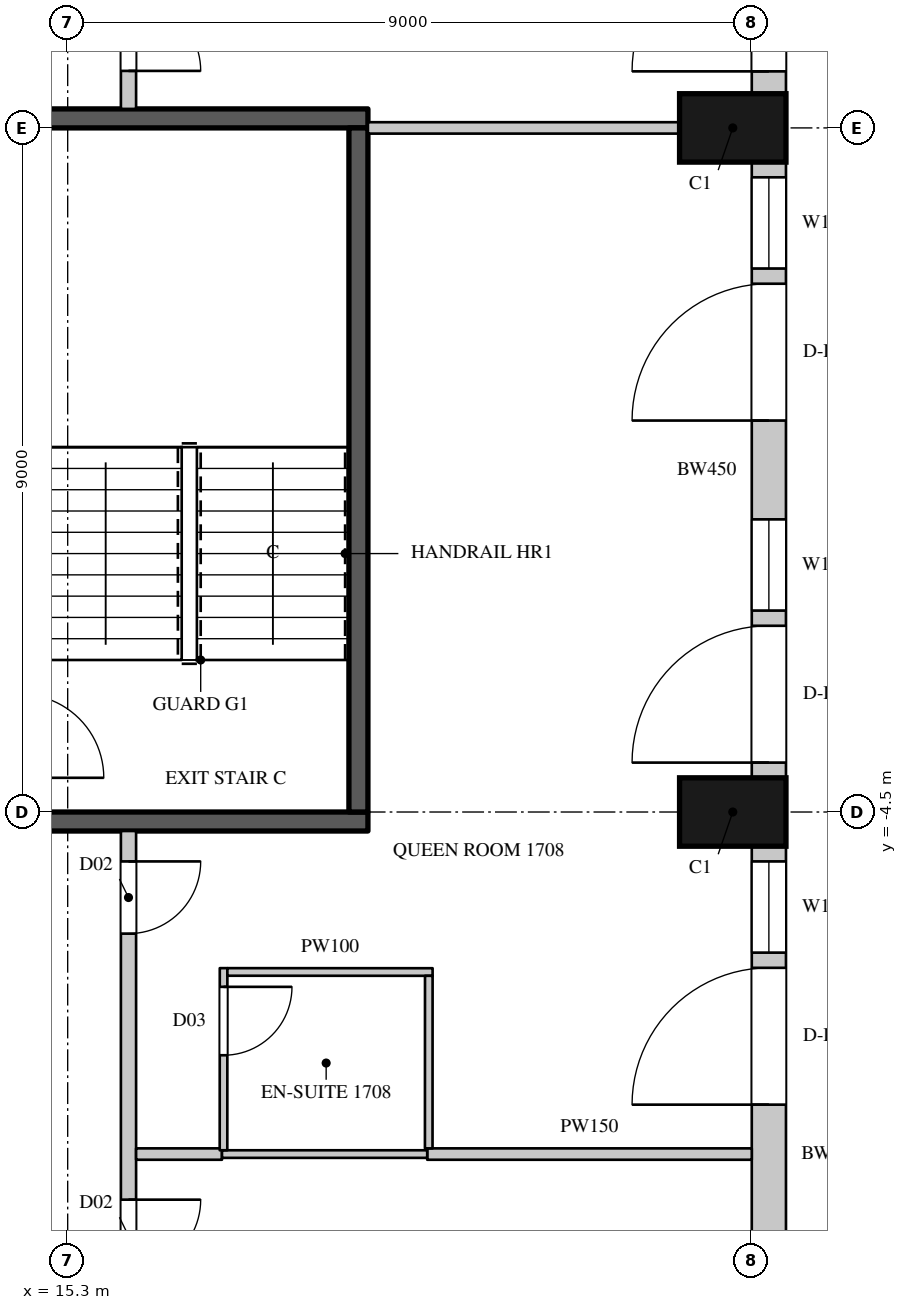
"""IFC4 building model, lengths in metres.
Left out: names, types, materials, properties, quantities, classifications, styles, units other than length and angle.
Written with IfcOpenShell. Run it as: python <this file> out.ifc"""

import sys

from ifc_helpers import new_model, si_unit, direction, frame, frame_2d, origin, origin_2d, place, context, subcontext, project, spatial, rectangle, extrude, element, fill, save


model = new_model("IFC4")
c1 = context("Model", 3, precision=1e-05, world=origin(), true_north=direction((0.0, 1.0)))
c2 = subcontext(c1, "Body", "Model", "MODEL_VIEW")
j1 = project(units=[si_unit("LENGTHUNIT", "METRE"), si_unit("PLANEANGLEUNIT", "RADIAN")], contexts=[c1])
p1 = place(None, origin())
s1 = spatial("IfcSite", under=j1, at=p1, CompositionType="ELEMENT")
p2 = place(p1, origin())
s2 = spatial("IfcBuilding", under=s1, at=p2, CompositionType="ELEMENT")
p3 = place(p2, frame((0.0, 0.0, 91.5)))
s3 = spatial("IfcBuildingStorey", under=s2, at=p3, CompositionType="ELEMENT", Elevation=91.5)
for number, where, z_axis, x_axis in (
    (1, (24.05, -4.5, 0.0), (0.0, 0.0, 1.0), (0.0, 1.0, 0.0)),
    (2, (24.05, 4.5, 0.0), (0.0, 0.0, 1.0), (0.0, 1.0, 0.0)),
):
    element("IfcColumn", number, at=place(p3, frame(where, z_axis=z_axis, x_axis=x_axis)), inside=s3, PredefinedType="COLUMN", context=c2, shape_type="SweptSolid", body=[
        extrude(rectangle(XDim=0.9, YDim=1.4, at=origin_2d()), origin(), (0.0, 0.0, 1.0), 3.6),
    ])
p4 = place(p3, frame((24.525, -13.05, 0.0), z_axis=(0.0, 0.0, 1.0), x_axis=(0.0, 1.0, 0.0)))
e3 = element("IfcWall", 3, at=p4, inside=s3, PredefinedType="SOLIDWALL", context=c2, shape_type="SweptSolid", body=[
    extrude(rectangle(XDim=8.1, YDim=0.45, at=frame_2d((4.05, 0.0))), origin(), (0.0, 0.0, 1.0), 3.3),
])
p5 = place(p4, frame((0.9, 0.0, 0.0)))
e4 = element("IfcOpeningElement", 4, at=p5, cuts=e3, PredefinedType="OPENING", context=c2, shape_type="SweptSolid", body=[
    extrude(rectangle(XDim=1.8, YDim=2.4, at=frame_2d((0.9, 1.2))), frame((0.0, 0.235, 0.0), z_axis=(0.0, -1.0, 0.0), x_axis=(1.0, 0.0, 0.0)), (0.0, 0.0, 1.0), 0.47),
])
p6 = place(p4, frame((4.7, 0.0, 0.0)))
e5 = element("IfcOpeningElement", 5, at=p6, cuts=e3, PredefinedType="OPENING", context=c2, shape_type="SweptSolid", body=[
    extrude(rectangle(XDim=1.8, YDim=2.4, at=frame_2d((0.9, 1.2))), frame((0.0, 0.235, 0.0), z_axis=(0.0, -1.0, 0.0), x_axis=(1.0, 0.0, 0.0)), (0.0, 0.0, 1.0), 0.47),
])
p7 = place(p4, frame((6.7, 0.0, 1.05)))
e6 = element("IfcOpeningElement", 6, at=p7, cuts=e3, PredefinedType="OPENING", context=c2, shape_type="SweptSolid", body=[
    extrude(rectangle(XDim=1.2, YDim=2.0, at=frame_2d((0.6, 1.0))), frame((0.0, 0.235, 0.0), z_axis=(0.0, -1.0, 0.0), x_axis=(1.0, 0.0, 0.0)), (0.0, 0.0, 1.0), 0.47),
])
p8 = place(p3, frame((24.525, -4.05, 0.0), z_axis=(0.0, 0.0, 1.0), x_axis=(0.0, 1.0, 0.0)))
e7 = element("IfcWall", 7, at=p8, inside=s3, PredefinedType="SOLIDWALL", context=c2, shape_type="SweptSolid", body=[
    extrude(rectangle(XDim=8.1, YDim=0.45, at=frame_2d((4.05, 0.0))), origin(), (0.0, 0.0, 1.0), 3.3),
])
p9 = place(p8, frame((0.2, 0.0, 0.0)))
e8 = element("IfcOpeningElement", 8, at=p9, cuts=e7, PredefinedType="OPENING", context=c2, shape_type="SweptSolid", body=[
    extrude(rectangle(XDim=1.8, YDim=2.4, at=frame_2d((0.9, 1.2))), frame((0.0, 0.235, 0.0), z_axis=(0.0, -1.0, 0.0), x_axis=(1.0, 0.0, 0.0)), (0.0, 0.0, 1.0), 0.47),
])
p10 = place(p8, frame((2.2, 0.0, 1.05)))
e9 = element("IfcOpeningElement", 9, at=p10, cuts=e7, PredefinedType="OPENING", context=c2, shape_type="SweptSolid", body=[
    extrude(rectangle(XDim=1.2, YDim=2.0, at=frame_2d((0.6, 1.0))), frame((0.0, 0.235, 0.0), z_axis=(0.0, -1.0, 0.0), x_axis=(1.0, 0.0, 0.0)), (0.0, 0.0, 1.0), 0.47),
])
p11 = place(p8, frame((4.7, 0.0, 0.0)))
e10 = element("IfcOpeningElement", 10, at=p11, cuts=e7, PredefinedType="OPENING", context=c2, shape_type="SweptSolid", body=[
    extrude(rectangle(XDim=1.8, YDim=2.4, at=frame_2d((0.9, 1.2))), frame((0.0, 0.235, 0.0), z_axis=(0.0, -1.0, 0.0), x_axis=(1.0, 0.0, 0.0)), (0.0, 0.0, 1.0), 0.47),
])
p12 = place(p8, frame((6.7, 0.0, 1.05)))
e11 = element("IfcOpeningElement", 11, at=p12, cuts=e7, PredefinedType="OPENING", context=c2, shape_type="SweptSolid", body=[
    extrude(rectangle(XDim=1.2, YDim=2.0, at=frame_2d((0.6, 1.0))), frame((0.0, 0.235, 0.0), z_axis=(0.0, -1.0, 0.0), x_axis=(1.0, 0.0, 0.0)), (0.0, 0.0, 1.0), 0.47),
])
p13 = place(p3, frame((24.525, 4.95, 0.0), z_axis=(0.0, 0.0, 1.0), x_axis=(0.0, 1.0, 0.0)))
e12 = element("IfcWall", 12, at=p13, inside=s3, PredefinedType="SOLIDWALL", context=c2, shape_type="SweptSolid", body=[
    extrude(rectangle(XDim=8.439, YDim=0.45, at=frame_2d((4.219, 0.0))), origin(), (0.0, 0.0, 1.0), 3.3),
])
p14 = place(p13, frame((0.294, 0.0, 0.0)))
e13 = element("IfcOpeningElement", 13, at=p14, cuts=e12, PredefinedType="OPENING", context=c2, shape_type="SweptSolid", body=[
    extrude(rectangle(XDim=1.8, YDim=2.4, at=frame_2d((0.9, 1.2))), frame((0.0, 0.235, 0.0), z_axis=(0.0, -1.0, 0.0), x_axis=(1.0, 0.0, 0.0)), (0.0, 0.0, 1.0), 0.47),
])
p15 = place(p13, frame((2.294, 0.0, 1.05)))
e14 = element("IfcOpeningElement", 14, at=p15, cuts=e12, PredefinedType="OPENING", context=c2, shape_type="SweptSolid", body=[
    extrude(rectangle(XDim=1.2, YDim=2.0, at=frame_2d((0.6, 1.0))), frame((0.0, 0.235, 0.0), z_axis=(0.0, -1.0, 0.0), x_axis=(1.0, 0.0, 0.0)), (0.0, 0.0, 1.0), 0.47),
])
p16 = place(p13, frame((5.232, 0.0, 1.05)))
e15 = element("IfcOpeningElement", 15, at=p16, cuts=e12, PredefinedType="OPENING", context=c2, shape_type="SweptSolid", body=[
    extrude(rectangle(XDim=2.7, YDim=2.0, at=frame_2d((1.35, 1.0))), frame((0.0, 0.235, 0.0), z_axis=(0.0, -1.0, 0.0), x_axis=(1.0, 0.0, 0.0)), (0.0, 0.0, 1.0), 0.47),
])
p17 = place(p3, frame((16.1, -17.5, 0.0), z_axis=(0.0, 0.0, 1.0), x_axis=(0.0, 1.0, 0.0)))
e16 = element("IfcWall", 16, at=p17, inside=s3, PredefinedType="PARTITIONING", context=c2, shape_type="SweptSolid", body=[
    extrude(rectangle(XDim=12.75, YDim=0.2, at=frame_2d((6.375, 0.0))), origin(), (0.0, 0.0, 1.0), 3.3),
])
p18 = place(p17, frame((2.75, 0.0, 0.0)))
e17 = element("IfcOpeningElement", 17, at=p18, cuts=e16, PredefinedType="OPENING", context=c2, shape_type="SweptSolid", body=[
    extrude(rectangle(XDim=0.95, YDim=2.2, at=frame_2d((0.475, 1.1))), frame((0.0, 0.11, 0.0), z_axis=(0.0, -1.0, 0.0), x_axis=(1.0, 0.0, 0.0)), (0.0, 0.0, 1.0), 0.22),
])
p19 = place(p17, frame((6.95, 0.0, 0.0)))
e18 = element("IfcOpeningElement", 18, at=p19, cuts=e16, PredefinedType="OPENING", context=c2, shape_type="SweptSolid", body=[
    extrude(rectangle(XDim=0.95, YDim=2.2, at=frame_2d((0.475, 1.1))), frame((0.0, 0.11, 0.0), z_axis=(0.0, -1.0, 0.0), x_axis=(1.0, 0.0, 0.0)), (0.0, 0.0, 1.0), 0.22),
])
p20 = place(p17, frame((11.4, 0.0, 0.0)))
e19 = element("IfcOpeningElement", 19, at=p20, cuts=e16, PredefinedType="OPENING", context=c2, shape_type="SweptSolid", body=[
    extrude(rectangle(XDim=0.95, YDim=2.2, at=frame_2d((0.475, 1.1))), frame((0.0, 0.11, 0.0), z_axis=(0.0, -1.0, 0.0), x_axis=(1.0, 0.0, 0.0)), (0.0, 0.0, 1.0), 0.22),
])
p21 = place(p3, frame((16.1, 4.75, 0.0), z_axis=(0.0, 0.0, 1.0), x_axis=(0.0, 1.0, 0.0)))
e20 = element("IfcWall", 20, at=p21, inside=s3, PredefinedType="PARTITIONING", context=c2, shape_type="SweptSolid", body=[
    extrude(rectangle(XDim=12.65, YDim=0.2, at=frame_2d((6.325, 0.0))), origin(), (0.0, 0.0, 1.0), 3.3),
])
p22 = place(p21, frame((0.5, 0.0, 0.0)))
e21 = element("IfcOpeningElement", 21, at=p22, cuts=e20, PredefinedType="OPENING", context=c2, shape_type="SweptSolid", body=[
    extrude(rectangle(XDim=0.95, YDim=2.2, at=frame_2d((0.475, 1.1))), frame((0.0, 0.11, 0.0), z_axis=(0.0, -1.0, 0.0), x_axis=(1.0, 0.0, 0.0)), (0.0, 0.0, 1.0), 0.22),
])
p23 = place(p21, frame((6.9, 0.0, 0.0)))
e22 = element("IfcOpeningElement", 22, at=p23, cuts=e20, PredefinedType="OPENING", context=c2, shape_type="SweptSolid", body=[
    extrude(rectangle(XDim=0.95, YDim=2.2, at=frame_2d((0.475, 1.1))), frame((0.0, 0.11, 0.0), z_axis=(0.0, -1.0, 0.0), x_axis=(1.0, 0.0, 0.0)), (0.0, 0.0, 1.0), 0.22),
])
p24 = place(p3, frame((16.2, -9.0, 0.0), z_axis=(0.0, 0.0, 1.0), x_axis=(1.0, 0.0, 0.0)))
e23 = element("IfcWall", 23, at=p24, inside=s3, PredefinedType="PARTITIONING", context=c2, shape_type="SweptSolid", body=[
    extrude(rectangle(XDim=1.13, YDim=0.15, at=frame_2d((0.565, 0.0))), origin(), (0.0, 0.0, 1.0), 2.65),
])
p25 = place(p3, frame((19.25, 4.5, 0.0), z_axis=(0.0, 0.0, 1.0), x_axis=(1.0, 0.0, 0.0)))
e24 = element("IfcWall", 24, at=p25, inside=s3, PredefinedType="PARTITIONING", context=c2, shape_type="SweptSolid", body=[
    extrude(rectangle(XDim=4.1, YDim=0.15, at=frame_2d((2.05, 0.0))), origin(), (0.0, 0.0, 1.0), 3.3),
])
p26 = place(p3, frame((20.03, -9.0, 0.0), z_axis=(0.0, 0.0, 1.0), x_axis=(1.0, 0.0, 0.0)))
e25 = element("IfcWall", 25, at=p26, inside=s3, PredefinedType="PARTITIONING", context=c2, shape_type="SweptSolid", body=[
    extrude(rectangle(XDim=4.27, YDim=0.15, at=frame_2d((2.135, 0.0))), origin(), (0.0, 0.0, 1.0), 2.65),
])
for number, where, z_axis, x_axis in (
    (26, (14.55, -4.625, 0.0), (0.0, 0.0, 1.0), (1.0, 0.0, 0.0)),
    (27, (14.55, 4.625, 0.0), (0.0, 0.0, 1.0), (1.0, 0.0, 0.0)),
):
    element("IfcWall", number, at=place(p3, frame(where, z_axis=z_axis, x_axis=x_axis)), inside=s3, PredefinedType="SHEAR", context=c2, shape_type="SweptSolid", body=[
        extrude(rectangle(XDim=4.7, YDim=0.25, at=frame_2d((2.35, 0.0))), origin(), (0.0, 0.0, 1.0), 3.3),
    ])
p27 = place(p3, frame((19.125, -4.5, 0.0), z_axis=(0.0, 0.0, 1.0), x_axis=(0.0, 1.0, 0.0)))
e28 = element("IfcWall", 28, at=p27, inside=s3, PredefinedType="SHEAR", context=c2, shape_type="SweptSolid", body=[
    extrude(rectangle(XDim=9.0, YDim=0.25, at=frame_2d((4.5, 0.0))), origin(), (0.0, 0.0, 1.0), 3.3),
])
p28 = place(p3, frame((17.33, -9.0, 0.0), z_axis=(0.0, 0.0, 1.0), x_axis=(1.0, 0.0, 0.0)))
e29 = element("IfcWall", 29, at=p28, inside=s3, PredefinedType="PARTITIONING", context=c2, shape_type="SweptSolid", body=[
    extrude(rectangle(XDim=2.7, YDim=0.1, at=frame_2d((1.35, 0.0))), origin(), (0.0, 0.0, 1.0), 2.65),
])
p29 = place(p3, frame((17.35, -8.95, 0.0), z_axis=(0.0, 0.0, 1.0), x_axis=(0.000407580973, 0.999999916939, 0.0)))
e30 = element("IfcWall", 30, at=p29, inside=s3, PredefinedType="PARTITIONING", context=c2, shape_type="SweptSolid", body=[
    extrude(rectangle(XDim=2.396, YDim=0.1, at=frame_2d((1.198, 0.0))), origin(), (0.0, 0.0, 1.0), 3.3),
])
p30 = place(p29, frame((1.25, 0.0, 0.0)))
e31 = element("IfcOpeningElement", 31, at=p30, cuts=e30, PredefinedType="OPENING", context=c2, shape_type="SweptSolid", body=[
    extrude(rectangle(XDim=0.9, YDim=2.2, at=frame_2d((0.45, 1.1))), frame((0.0, 0.06, 0.0), z_axis=(0.0, -1.0, 0.0), x_axis=(1.0, 0.0, 0.0)), (0.0, 0.0, 1.0), 0.12),
])
p31 = place(p3, frame((17.401, -6.604, 0.0), z_axis=(0.0, 0.0, 1.0), x_axis=(0.9999999346, -0.000361663629, 0.0)))
e32 = element("IfcWall", 32, at=p31, inside=s3, PredefinedType="PARTITIONING", context=c2, shape_type="SweptSolid", body=[
    extrude(rectangle(XDim=2.7, YDim=0.1, at=frame_2d((1.35, 0.0))), origin(), (0.0, 0.0, 1.0), 3.3),
])
p32 = place(p3, frame((20.05, -8.925, 0.0), z_axis=(0.0, 0.0, 1.0), x_axis=(0.000430200003, 0.999999907464, 0.0)))
e33 = element("IfcWall", 33, at=p32, inside=s3, PredefinedType="PARTITIONING", context=c2, shape_type="SweptSolid", body=[
    extrude(rectangle(XDim=2.27, YDim=0.1, at=frame_2d((1.135, 0.0))), origin(), (0.0, 0.0, 1.0), 3.3),
])
p33 = place(p6, origin())
e34 = element("IfcDoor", 34, at=p33, inside=s3, OperationType="SLIDING_TO_LEFT", PredefinedType="DOOR", context=c2, shape_type="SweptSolid", body=[
    extrude(rectangle(XDim=1.8, YDim=2.4, at=frame_2d((0.9, 1.2))), frame((0.0, 0.13, 0.0), z_axis=(0.0, -1.0, 0.0), x_axis=(1.0, 0.0, 0.0)), (0.0, 0.0, 1.0), 0.05),
])
fill(e5, e34)
p34 = place(p7, origin())
e35 = element("IfcWindow", 35, at=p34, inside=s3, PartitioningType="SINGLE_PANEL", PredefinedType="WINDOW", context=c2, shape_type="SweptSolid", body=[
    extrude(rectangle(XDim=1.2, YDim=2.0, at=frame_2d((0.6, 1.0))), frame((0.0, 0.135, 0.0), z_axis=(0.0, -1.0, 0.0), x_axis=(1.0, 0.0, 0.0)), (0.0, 0.0, 1.0), 0.06),
])
fill(e6, e35)
p35 = place(p9, origin())
e36 = element("IfcDoor", 36, at=p35, inside=s3, OperationType="SLIDING_TO_LEFT", PredefinedType="DOOR", context=c2, shape_type="SweptSolid", body=[
    extrude(rectangle(XDim=1.8, YDim=2.4, at=frame_2d((0.9, 1.2))), frame((0.0, 0.13, 0.0), z_axis=(0.0, -1.0, 0.0), x_axis=(1.0, 0.0, 0.0)), (0.0, 0.0, 1.0), 0.05),
])
fill(e8, e36)
p36 = place(p10, origin())
e37 = element("IfcWindow", 37, at=p36, inside=s3, PartitioningType="SINGLE_PANEL", PredefinedType="WINDOW", context=c2, shape_type="SweptSolid", body=[
    extrude(rectangle(XDim=1.2, YDim=2.0, at=frame_2d((0.6, 1.0))), frame((0.0, 0.135, 0.0), z_axis=(0.0, -1.0, 0.0), x_axis=(1.0, 0.0, 0.0)), (0.0, 0.0, 1.0), 0.06),
])
fill(e9, e37)
p37 = place(p11, origin())
e38 = element("IfcDoor", 38, at=p37, inside=s3, OperationType="SLIDING_TO_LEFT", PredefinedType="DOOR", context=c2, shape_type="SweptSolid", body=[
    extrude(rectangle(XDim=1.8, YDim=2.4, at=frame_2d((0.9, 1.2))), frame((0.0, 0.13, 0.0), z_axis=(0.0, -1.0, 0.0), x_axis=(1.0, 0.0, 0.0)), (0.0, 0.0, 1.0), 0.05),
])
fill(e10, e38)
p38 = place(p12, origin())
e39 = element("IfcWindow", 39, at=p38, inside=s3, PartitioningType="SINGLE_PANEL", PredefinedType="WINDOW", context=c2, shape_type="SweptSolid", body=[
    extrude(rectangle(XDim=1.2, YDim=2.0, at=frame_2d((0.6, 1.0))), frame((0.0, 0.135, 0.0), z_axis=(0.0, -1.0, 0.0), x_axis=(1.0, 0.0, 0.0)), (0.0, 0.0, 1.0), 0.06),
])
fill(e11, e39)
p39 = place(p14, origin())
e40 = element("IfcDoor", 40, at=p39, inside=s3, OperationType="SLIDING_TO_LEFT", PredefinedType="DOOR", context=c2, shape_type="SweptSolid", body=[
    extrude(rectangle(XDim=1.8, YDim=2.4, at=frame_2d((0.9, 1.2))), frame((0.0, 0.13, 0.0), z_axis=(0.0, -1.0, 0.0), x_axis=(1.0, 0.0, 0.0)), (0.0, 0.0, 1.0), 0.05),
])
fill(e13, e40)
p40 = place(p19, origin())
e41 = element("IfcDoor", 41, at=p40, inside=s3, OperationType="SINGLE_SWING_LEFT", PredefinedType="DOOR", context=c2, shape_type="SweptSolid", body=[
    extrude(rectangle(XDim=0.95, YDim=2.2, at=frame_2d((0.475, 1.1))), frame((0.0, 0.025, 0.0), z_axis=(0.0, -1.0, 0.0), x_axis=(1.0, 0.0, 0.0)), (0.0, 0.0, 1.0), 0.05),
])
fill(e18, e41)
p41 = place(p20, origin())
e42 = element("IfcDoor", 42, at=p41, inside=s3, OperationType="SINGLE_SWING_LEFT", PredefinedType="DOOR", context=c2, shape_type="SweptSolid", body=[
    extrude(rectangle(XDim=0.95, YDim=2.2, at=frame_2d((0.475, 1.1))), frame((0.0, 0.025, 0.0), z_axis=(0.0, -1.0, 0.0), x_axis=(1.0, 0.0, 0.0)), (0.0, 0.0, 1.0), 0.05),
])
fill(e19, e42)
p42 = place(p30, origin())
e43 = element("IfcDoor", 43, at=p42, inside=s3, OperationType="SINGLE_SWING_LEFT", PredefinedType="DOOR", context=c2, shape_type="SweptSolid", body=[
    extrude(rectangle(XDim=0.9, YDim=2.2, at=frame_2d((0.45, 1.1))), frame((0.0, 0.025, 0.0), z_axis=(0.0, -1.0, 0.0), x_axis=(1.0, 0.0, 0.0)), (0.0, 0.0, 1.0), 0.05),
])
fill(e31, e43)
p43 = place(p22, origin())
e44 = element("IfcDoor", 44, at=p43, inside=s3, OperationType="SINGLE_SWING_RIGHT", PredefinedType="DOOR", context=c2, shape_type="SweptSolid", body=[
    extrude(rectangle(XDim=0.95, YDim=2.2, at=frame_2d((0.475, 1.1))), frame((0.0, 0.025, 0.0), z_axis=(0.0, -1.0, 0.0), x_axis=(1.0, 0.0, 0.0)), (0.0, 0.0, 1.0), 0.05),
])
fill(e21, e44)
save(model, sys.argv[1])
